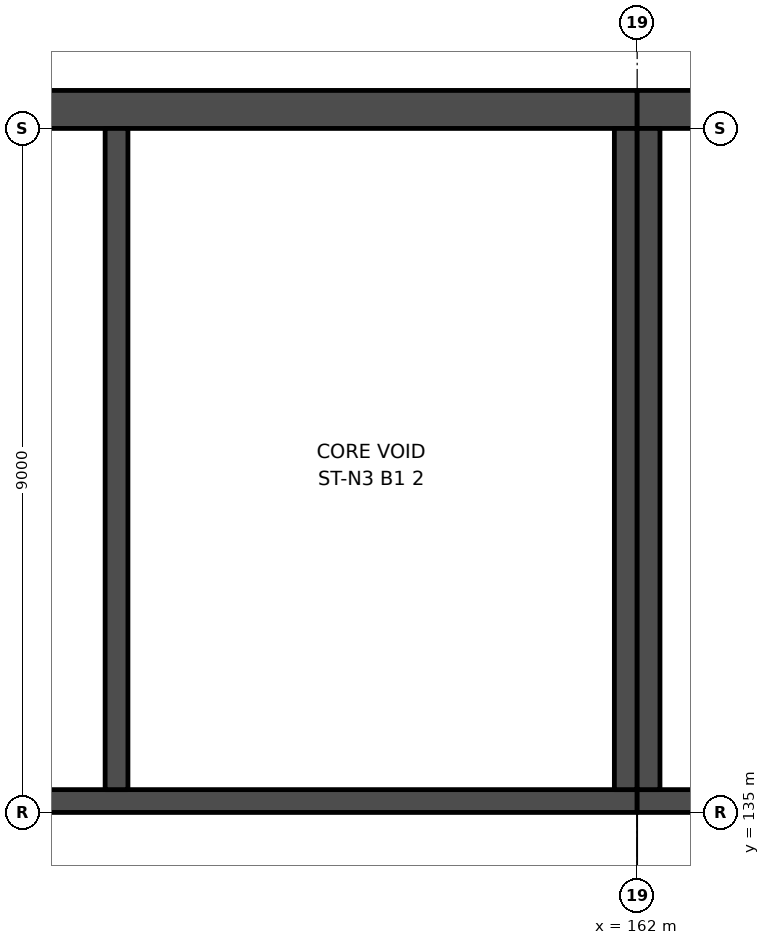
"""IFC4 building model, lengths in metres.
Left out: names, types, materials, properties, quantities, classifications, styles, units other than length and angle.
Written with IfcOpenShell. Run it as: python <this file> out.ifc"""

import sys

from ifc_helpers import new_model, si_unit, direction, frame, frame_2d, origin, place, context, subcontext, project, spatial, rectangle, extrude, element, save


model = new_model("IFC4")
c1 = context("Model", 3, precision=1e-05, world=origin(), true_north=direction((0.0, 1.0)))
c2 = subcontext(c1, "Body", "Model", "MODEL_VIEW")
j1 = project(units=[si_unit("LENGTHUNIT", "METRE"), si_unit("PLANEANGLEUNIT", "RADIAN")], contexts=[c1])
p1 = place(None, origin())
s1 = spatial("IfcSite", under=j1, at=p1, CompositionType="ELEMENT")
p2 = place(p1, origin())
s2 = spatial("IfcBuilding", under=s1, at=p2, CompositionType="ELEMENT")
p3 = place(p2, frame((0.0, 0.0, -6.0)))
s3 = spatial("IfcBuildingStorey", under=s2, at=p3, CompositionType="ELEMENT", Elevation=-6.0)
p4 = place(p3, frame((144.0, 135.15, 0.0), z_axis=(0.0, 0.0, 1.0), x_axis=(1.0, 0.0, 0.0)))
e1 = element("IfcWall", 1, at=p4, inside=s3, PredefinedType="SHEAR", context=c2, shape_type="SweptSolid", body=[
    extrude(rectangle(XDim=18.0, YDim=0.3, at=frame_2d((9.0, 0.0))), origin(), (0.0, 0.0, 1.0), 6.0),
])
p5 = place(p4, frame((1.5, 0.0, 0.0)))
e2 = element("IfcOpeningElement", 2, at=p5, cuts=e1, PredefinedType="OPENING", context=c2, shape_type="SweptSolid", body=[
    extrude(rectangle(XDim=1.2, YDim=2.1, at=frame_2d((0.6, 1.05))), frame((0.0, 0.16, 0.0), z_axis=(0.0, -1.0, 0.0), x_axis=(1.0, 0.0, 0.0)), (0.0, 0.0, 1.0), 0.32),
])
p6 = place(p3, frame((144.0, 144.25, 0.0), z_axis=(0.0, 0.0, 1.0), x_axis=(1.0, 0.0, 0.0)))
e3 = element("IfcWall", 3, at=p6, inside=s3, PredefinedType="SHEAR", context=c2, shape_type="SweptSolid", body=[
    extrude(rectangle(XDim=18.0, YDim=0.5, at=frame_2d((9.0, 0.0))), origin(), (0.0, 0.0, 1.0), 6.0),
])
for number, where, z_axis, x_axis in (
    (4, (161.85, 135.3, 0.0), (0.0, 0.0, 1.0), (0.0, 1.0, 0.0)),
    (5, (155.15, 135.3, 0.0), (0.0, 0.0, 1.0), (0.0, 1.0, 0.0)),
):
    element("IfcWall", number, at=place(p3, frame(where, z_axis=z_axis, x_axis=x_axis)), inside=s3, PredefinedType="SHEAR", context=c2, shape_type="SweptSolid", body=[
        extrude(rectangle(XDim=8.7, YDim=0.3, at=frame_2d((4.35, 0.0))), origin(), (0.0, 0.0, 1.0), 6.0),
    ])
p7 = place(p3, frame((180.0, 135.15, 0.0), z_axis=(0.0, 0.0, 1.0), x_axis=(-1.0, 0.0, 0.0)))
e6 = element("IfcWall", 6, at=p7, inside=s3, PredefinedType="SHEAR", context=c2, shape_type="SweptSolid", body=[
    extrude(rectangle(XDim=18.0, YDim=0.3, at=frame_2d((9.0, 0.0))), origin(), (0.0, 0.0, 1.0), 6.0),
])
p8 = place(p3, frame((180.0, 144.25, 0.0), z_axis=(0.0, 0.0, 1.0), x_axis=(-1.0, 0.0, 0.0)))
e7 = element("IfcWall", 7, at=p8, inside=s3, PredefinedType="SHEAR", context=c2, shape_type="SweptSolid", body=[
    extrude(rectangle(XDim=18.0, YDim=0.5, at=frame_2d((9.0, 0.0))), origin(), (0.0, 0.0, 1.0), 6.0),
])
p9 = place(p3, frame((162.15, 135.3, 0.0), z_axis=(0.0, 0.0, 1.0), x_axis=(0.0, 1.0, 0.0)))
e8 = element("IfcWall", 8, at=p9, inside=s3, PredefinedType="SHEAR", context=c2, shape_type="SweptSolid", body=[
    extrude(rectangle(XDim=8.7, YDim=0.3, at=frame_2d((4.35, 0.0))), origin(), (0.0, 0.0, 1.0), 6.0),
])
save(model, sys.argv[1])
